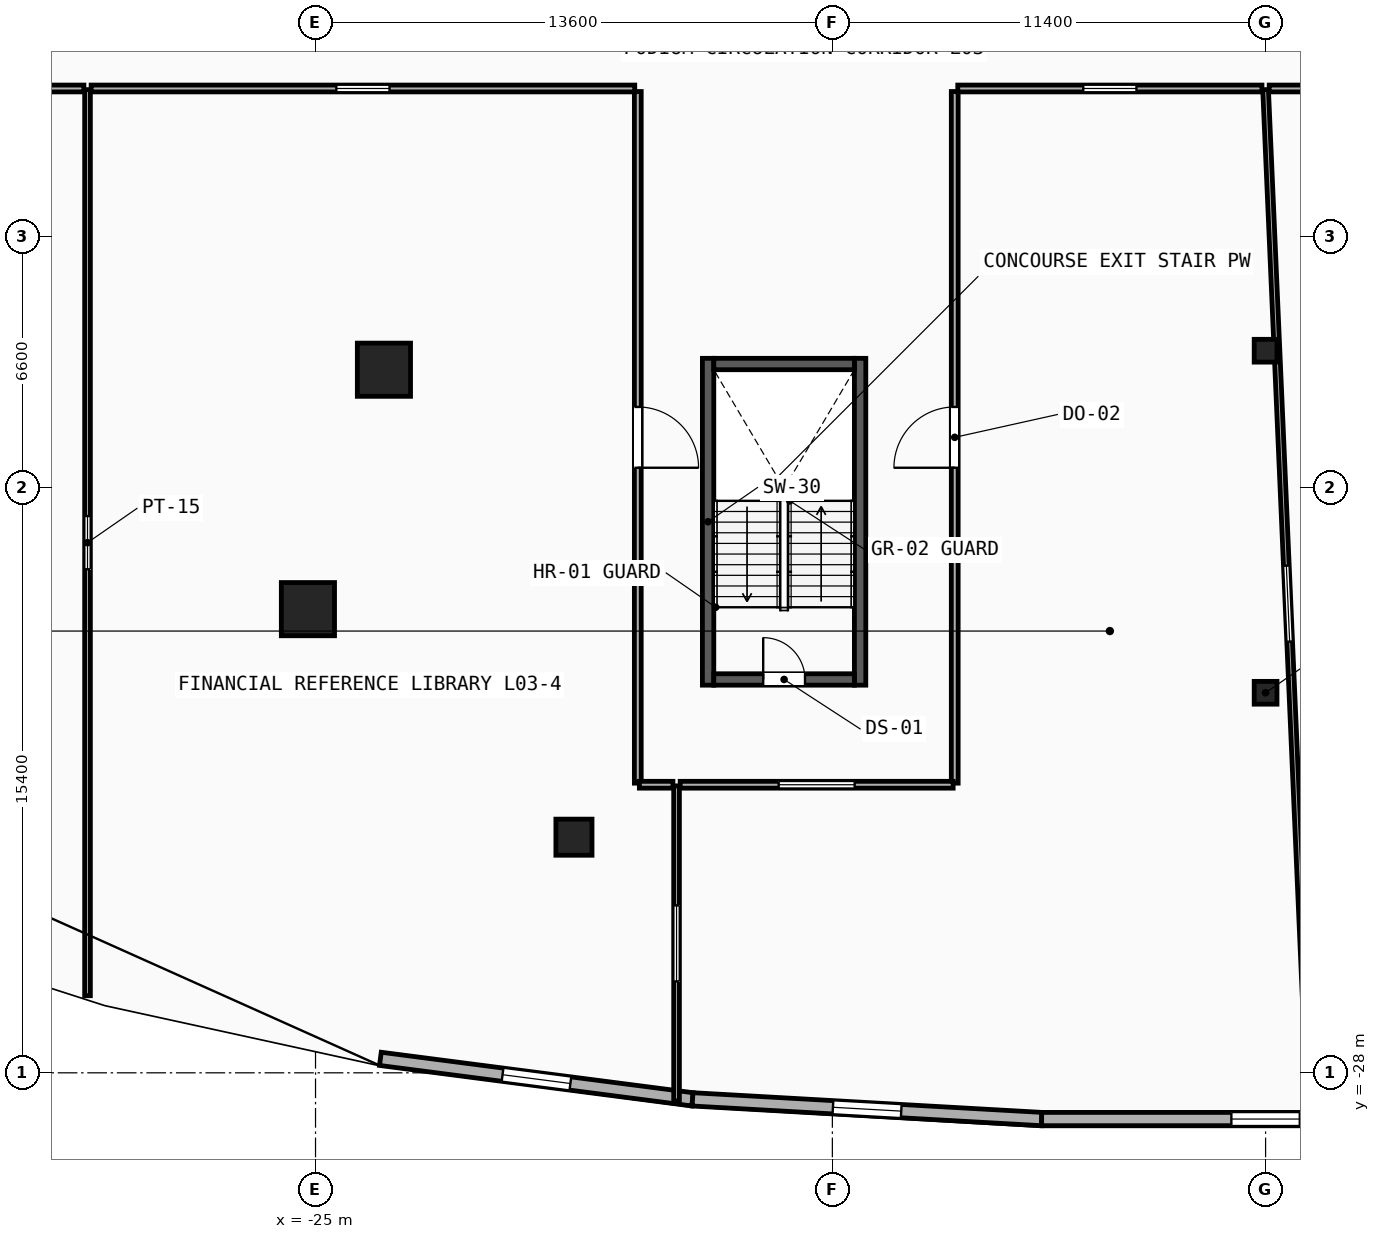
"""IFC4 building model, lengths in metres.
Left out: names, types, materials, properties, quantities, classifications, styles, units other than length and angle.
Written with IfcOpenShell. Run it as: python <this file> out.ifc"""

import sys

from ifc_helpers import new_model, si_unit, direction, frame, frame_2d, origin, origin_2d, place, context, subcontext, project, spatial, rectangle, hollow_rectangle, circle, extrude, element, fill, save


model = new_model("IFC4")
c1 = context("Model", 3, precision=1e-05, world=origin(), true_north=direction((0.0, 1.0)))
c2 = subcontext(c1, "Body", "Model", "MODEL_VIEW")
j1 = project(units=[si_unit("LENGTHUNIT", "METRE"), si_unit("PLANEANGLEUNIT", "RADIAN")], contexts=[c1])
p1 = place(None, origin())
s1 = spatial("IfcSite", under=j1, at=p1, CompositionType="ELEMENT")
p2 = place(p1, origin())
s2 = spatial("IfcBuilding", under=s1, at=p2, CompositionType="ELEMENT")
p3 = place(p2, frame((0.0, 0.0, 16.0)))
s3 = spatial("IfcBuildingStorey", under=s2, at=p3, CompositionType="ELEMENT", Elevation=16.0)
for number, where, z_axis, x_axis in (
    (1, (-23.2, -9.5, 0.0), (0.0, 0.0, 1.0), (1.0, 0.0, 0.0)),
    (2, (-25.2, -15.8, 0.0), (0.0, 0.0, 1.0), (1.0, 0.0, 0.0)),
):
    element("IfcColumn", number, at=place(p3, frame(where, z_axis=z_axis, x_axis=x_axis)), inside=s3, PredefinedType="COLUMN", context=c2, shape_type="SweptSolid", body=[
        extrude(rectangle(XDim=1.4, YDim=1.4, at=origin_2d()), origin(), (0.0, 0.0, 1.0), 4.0),
    ])
for number, where, z_axis, x_axis in (
    (3, (0.0, -18.0, 0.0), (0.0, 0.0, 1.0), (1.0, 0.0, 0.0)),
    (4, (0.0, -9.0, 0.0), (0.0, 0.0, 1.0), (1.0, 0.0, 0.0)),
):
    element("IfcColumn", number, at=place(p3, frame(where, z_axis=z_axis, x_axis=x_axis)), inside=s3, PredefinedType="COLUMN", context=c2, shape_type="SweptSolid", body=[
        extrude(hollow_rectangle(XDim=0.6, YDim=0.6, WallThickness=0.032, at=origin_2d()), origin(), (0.0, 0.0, 1.0), 4.0),
    ])
p4 = place(p3, frame((-18.2, -21.8, 0.0), z_axis=(0.0, 0.0, 1.0), x_axis=(1.0, 0.0, 0.0)))
e5 = element("IfcColumn", 5, at=p4, inside=s3, PredefinedType="PILASTER", context=c2, shape_type="SweptSolid", body=[
    extrude(circle(Radius=0.475, at=origin_2d()), origin(), (0.0, 0.0, 1.0), 4.0),
])
p5 = place(p3, frame((-23.293, -27.632, 0.0), z_axis=(0.0, 0.0, 1.0), x_axis=(0.99168663472, -0.128676410104, 0.0)))
e6 = element("IfcWall", 6, at=p5, inside=s3, PredefinedType="SOLIDWALL", context=c2, shape_type="SweptSolid", body=[
    extrude(rectangle(XDim=8.284, YDim=0.35, at=frame_2d((4.142, 0.0))), origin(), (0.0, 0.0, 1.0), 3.65),
])
p6 = place(p5, frame((3.242, 0.0, 0.85)))
e7 = element("IfcOpeningElement", 7, at=p6, cuts=e6, PredefinedType="OPENING", context=c2, shape_type="SweptSolid", body=[
    extrude(rectangle(XDim=1.8, YDim=2.4, at=frame_2d((0.9, 1.2))), frame((0.0, 0.185, 0.0), z_axis=(0.0, -1.0, 0.0), x_axis=(1.0, 0.0, 0.0)), (0.0, 0.0, 1.0), 0.37),
])
p7 = place(p3, frame((-15.079, -28.698, 0.0), z_axis=(0.0, 0.0, 1.0), x_axis=(0.998413463137, -0.056307695976, 0.0)))
e8 = element("IfcWall", 8, at=p7, inside=s3, PredefinedType="SOLIDWALL", context=c2, shape_type="SweptSolid", body=[
    extrude(rectangle(XDim=9.201, YDim=0.35, at=frame_2d((4.6, 0.0))), origin(), (0.0, 0.0, 1.0), 3.65),
])
p8 = place(p7, frame((3.7, 0.0, 0.85)))
e9 = element("IfcOpeningElement", 9, at=p8, cuts=e8, PredefinedType="OPENING", context=c2, shape_type="SweptSolid", body=[
    extrude(rectangle(XDim=1.8, YDim=2.4, at=frame_2d((0.9, 1.2))), frame((0.0, 0.185, 0.0), z_axis=(0.0, -1.0, 0.0), x_axis=(1.0, 0.0, 0.0)), (0.0, 0.0, 1.0), 0.37),
])
p9 = place(p3, frame((-5.893, -29.216, 0.0), z_axis=(0.0, 0.0, 1.0), x_axis=(1.0, 0.0, 0.0)))
e10 = element("IfcWall", 10, at=p9, inside=s3, PredefinedType="SOLIDWALL", context=c2, shape_type="SweptSolid", body=[
    extrude(rectangle(XDim=11.785, YDim=0.35, at=frame_2d((5.893, 0.0))), origin(), (0.0, 0.0, 1.0), 3.65),
])
p10 = place(p9, frame((4.992, 0.0, 0.85)))
e11 = element("IfcOpeningElement", 11, at=p10, cuts=e10, PredefinedType="OPENING", context=c2, shape_type="SweptSolid", body=[
    extrude(rectangle(XDim=1.8, YDim=2.4, at=frame_2d((0.9, 1.2))), frame((0.0, 0.185, 0.0), z_axis=(0.0, -1.0, 0.0), x_axis=(1.0, 0.0, 0.0)), (0.0, 0.0, 1.0), 0.37),
])
for number, where, z_axis, x_axis in (
    (12, (-14.67, -17.8, 0.0), (0.0, 0.0, 1.0), (0.0, 1.0, 0.0)),
    (13, (-10.67, -17.8, 0.0), (0.0, 0.0, 1.0), (0.0, 1.0, 0.0)),
):
    element("IfcWall", number, at=place(p3, frame(where, z_axis=z_axis, x_axis=x_axis)), inside=s3, PredefinedType="SHEAR", context=c2, shape_type="SweptSolid", body=[
        extrude(rectangle(XDim=8.6, YDim=0.3, at=frame_2d((4.3, 0.0))), origin(), (0.0, 0.0, 1.0), 3.65),
    ])
p11 = place(p3, frame((-14.52, -17.65, 0.0), z_axis=(0.0, 0.0, 1.0), x_axis=(1.0, 0.0, 0.0)))
e14 = element("IfcWall", 14, at=p11, inside=s3, PredefinedType="SHEAR", context=c2, shape_type="SweptSolid", body=[
    extrude(rectangle(XDim=3.7, YDim=0.3, at=frame_2d((1.85, 0.0))), origin(), (0.0, 0.0, 1.0), 3.65),
])
p12 = place(p11, frame((1.3, 0.0, 0.0)))
e15 = element("IfcOpeningElement", 15, at=p12, cuts=e14, PredefinedType="OPENING", context=c2, shape_type="SweptSolid", body=[
    extrude(rectangle(XDim=1.1, YDim=2.15, at=frame_2d((0.55, 1.075))), frame((0.0, 0.16, 0.0), z_axis=(0.0, -1.0, 0.0), x_axis=(1.0, 0.0, 0.0)), (0.0, 0.0, 1.0), 0.32),
])
p13 = place(p3, frame((-14.52, -9.35, 0.0), z_axis=(0.0, 0.0, 1.0), x_axis=(1.0, 0.0, 0.0)))
e16 = element("IfcWall", 16, at=p13, inside=s3, PredefinedType="SHEAR", context=c2, shape_type="SweptSolid", body=[
    extrude(rectangle(XDim=3.7, YDim=0.3, at=frame_2d((1.85, 0.0))), origin(), (0.0, 0.0, 1.0), 3.65),
])
p14 = place(p3, frame((-31.0, -25.971, 0.0), z_axis=(0.0, 0.0, 1.0), x_axis=(0.0, 1.0, 0.0)))
e17 = element("IfcWall", 17, at=p14, inside=s3, PredefinedType="PARTITIONING", context=c2, shape_type="SweptSolid", body=[
    extrude(rectangle(XDim=23.841, YDim=0.15, at=frame_2d((11.921, 0.0))), origin(), (0.0, 0.0, 1.0), 3.65),
])
p15 = place(p14, frame((11.221, 0.0, 1.05)))
e18 = element("IfcOpeningElement", 18, at=p15, cuts=e17, PredefinedType="OPENING", context=c2, shape_type="SweptSolid", body=[
    extrude(rectangle(XDim=1.4, YDim=1.5, at=frame_2d((0.7, 0.75))), frame((0.0, 0.085, 0.0), z_axis=(0.0, -1.0, 0.0), x_axis=(1.0, 0.0, 0.0)), (0.0, 0.0, 1.0), 0.17),
])
p16 = place(p3, frame((-15.5, -28.74, 0.0), z_axis=(0.0, 0.0, 1.0), x_axis=(0.0, 1.0, 0.0)))
e19 = element("IfcWall", 19, at=p16, inside=s3, PredefinedType="PARTITIONING", context=c2, shape_type="SweptSolid", body=[
    extrude(rectangle(XDim=8.29, YDim=0.15, at=frame_2d((4.145, 0.0))), origin(), (0.0, 0.0, 1.0), 3.65),
])
p17 = place(p16, frame((3.145, 0.0, 1.05)))
e20 = element("IfcOpeningElement", 20, at=p17, cuts=e19, PredefinedType="OPENING", context=c2, shape_type="SweptSolid", body=[
    extrude(rectangle(XDim=2.0, YDim=1.5, at=frame_2d((1.0, 0.75))), frame((0.0, 0.085, 0.0), z_axis=(0.0, -1.0, 0.0), x_axis=(1.0, 0.0, 0.0)), (0.0, 0.0, 1.0), 0.17),
])
p18 = place(p3, frame((1.179, -29.18, 0.0), z_axis=(0.0, 0.0, 1.0), x_axis=(-0.043560875221, 0.999050774561, 0.0)))
e21 = element("IfcWall", 21, at=p18, inside=s3, PredefinedType="PARTITIONING", context=c2, shape_type="SweptSolid", body=[
    extrude(rectangle(XDim=27.076, YDim=0.15, at=frame_2d((13.538, 0.0))), origin(), (0.0, 0.0, 1.0), 2.877),
])
p19 = place(p18, frame((12.538, 0.0, 1.05)))
e22 = element("IfcOpeningElement", 22, at=p19, cuts=e21, PredefinedType="OPENING", context=c2, shape_type="SweptSolid", body=[
    extrude(rectangle(XDim=2.0, YDim=1.5, at=frame_2d((1.0, 0.75))), frame((0.0, 0.085, 0.0), z_axis=(0.0, -1.0, 0.0), x_axis=(1.0, 0.0, 0.0)), (0.0, 0.0, 1.0), 0.17),
])
p20 = place(p3, frame((-8.18, -20.378, 0.0), z_axis=(0.0, 0.0, 1.0), x_axis=(0.0, 1.0, 0.0)))
e23 = element("IfcWall", 23, at=p20, inside=s3, PredefinedType="PARTITIONING", context=c2, shape_type="SweptSolid", body=[
    extrude(rectangle(XDim=18.198, YDim=0.18, at=frame_2d((9.099, 0.0))), origin(), (0.0, 0.0, 1.0), 3.65),
])
p21 = place(p20, frame((8.299, 0.0, 0.0)))
e24 = element("IfcOpeningElement", 24, at=p21, cuts=e23, PredefinedType="OPENING", context=c2, shape_type="SweptSolid", body=[
    extrude(rectangle(XDim=1.6, YDim=2.2, at=frame_2d((0.8, 1.1))), frame((0.0, 0.1, 0.0), z_axis=(0.0, -1.0, 0.0), x_axis=(1.0, 0.0, 0.0)), (0.0, 0.0, 1.0), 0.2),
])
p22 = place(p3, frame((-8.1, -2.1, 0.0), z_axis=(0.0, 0.0, 1.0), x_axis=(1.0, 0.0, 0.0)))
e25 = element("IfcWall", 25, at=p22, inside=s3, PredefinedType="PARTITIONING", context=c2, shape_type="SweptSolid", body=[
    extrude(rectangle(XDim=8.005, YDim=0.18, at=frame_2d((4.002, 0.0))), origin(), (0.0, 0.0, 1.0), 3.65),
])
p23 = place(p22, frame((3.302, 0.0, 1.05)))
e26 = element("IfcOpeningElement", 26, at=p23, cuts=e25, PredefinedType="OPENING", context=c2, shape_type="SweptSolid", body=[
    extrude(rectangle(XDim=1.4, YDim=1.5, at=frame_2d((0.7, 0.75))), frame((0.0, 0.1, 0.0), z_axis=(0.0, -1.0, 0.0), x_axis=(1.0, 0.0, 0.0)), (0.0, 0.0, 1.0), 0.2),
])
p24 = place(p3, frame((-15.405, -20.42, 0.0), z_axis=(0.0, 0.0, 1.0), x_axis=(1.0, 0.0, 0.0)))
e27 = element("IfcWall", 27, at=p24, inside=s3, PredefinedType="PARTITIONING", context=c2, shape_type="SweptSolid", body=[
    extrude(rectangle(XDim=7.184, YDim=0.18, at=frame_2d((3.592, 0.0))), origin(), (0.0, 0.0, 1.0), 3.65),
])
p25 = place(p24, frame((2.592, 0.0, 1.05)))
e28 = element("IfcOpeningElement", 28, at=p25, cuts=e27, PredefinedType="OPENING", context=c2, shape_type="SweptSolid", body=[
    extrude(rectangle(XDim=2.0, YDim=1.5, at=frame_2d((1.0, 0.75))), frame((0.0, 0.1, 0.0), z_axis=(0.0, -1.0, 0.0), x_axis=(1.0, 0.0, 0.0)), (0.0, 0.0, 1.0), 0.2),
])
p26 = place(p3, frame((0.095, -2.1, 0.0), z_axis=(0.0, 0.0, 1.0), x_axis=(1.0, 0.0, 0.0)))
e29 = element("IfcWall", 29, at=p26, inside=s3, PredefinedType="PARTITIONING", context=c2, shape_type="SweptSolid", body=[
    extrude(rectangle(XDim=15.31, YDim=0.18, at=frame_2d((7.655, 0.0))), origin(), (0.0, 0.0, 1.0), 2.877),
])
p27 = place(p26, frame((6.855, 0.0, 0.0)))
e30 = element("IfcOpeningElement", 30, at=p27, cuts=e29, PredefinedType="OPENING", context=c2, shape_type="SweptSolid", body=[
    extrude(rectangle(XDim=1.6, YDim=2.2, at=frame_2d((0.8, 1.1))), frame((0.0, 0.1, 0.0), z_axis=(0.0, -1.0, 0.0), x_axis=(1.0, 0.0, 0.0)), (0.0, 0.0, 1.0), 0.2),
])
p28 = place(p3, frame((-16.52, -2.18, 0.0), z_axis=(0.0, 0.0, 1.0), x_axis=(0.0, -1.0, 0.0)))
e31 = element("IfcWall", 31, at=p28, inside=s3, PredefinedType="PARTITIONING", context=c2, shape_type="SweptSolid", body=[
    extrude(rectangle(XDim=18.198, YDim=0.18, at=frame_2d((9.099, 0.0))), origin(), (0.0, 0.0, 1.0), 3.65),
])
p29 = place(p28, frame((8.299, 0.0, 0.0)))
e32 = element("IfcOpeningElement", 32, at=p29, cuts=e31, PredefinedType="OPENING", context=c2, shape_type="SweptSolid", body=[
    extrude(rectangle(XDim=1.6, YDim=2.2, at=frame_2d((0.8, 1.1))), frame((0.0, 0.1, 0.0), z_axis=(0.0, -1.0, 0.0), x_axis=(1.0, 0.0, 0.0)), (0.0, 0.0, 1.0), 0.2),
])
p30 = place(p3, frame((-30.905, -2.1, 0.0), z_axis=(0.0, 0.0, 1.0), x_axis=(1.0, 0.0, 0.0)))
e33 = element("IfcWall", 33, at=p30, inside=s3, PredefinedType="PARTITIONING", context=c2, shape_type="SweptSolid", body=[
    extrude(rectangle(XDim=14.305, YDim=0.18, at=frame_2d((7.152, 0.0))), origin(), (0.0, 0.0, 1.0), 3.65),
])
p31 = place(p30, frame((6.452, 0.0, 1.05)))
e34 = element("IfcOpeningElement", 34, at=p31, cuts=e33, PredefinedType="OPENING", context=c2, shape_type="SweptSolid", body=[
    extrude(rectangle(XDim=1.4, YDim=1.5, at=frame_2d((0.7, 0.75))), frame((0.0, 0.1, 0.0), z_axis=(0.0, -1.0, 0.0), x_axis=(1.0, 0.0, 0.0)), (0.0, 0.0, 1.0), 0.2),
])
p32 = place(p3, frame((-16.479, -20.42, 0.0), z_axis=(0.0, 0.0, 1.0), x_axis=(1.0, 0.0, 0.0)))
e35 = element("IfcWall", 35, at=p32, inside=s3, PredefinedType="PARTITIONING", context=c2, shape_type="SweptSolid", body=[
    extrude(rectangle(XDim=0.884, YDim=0.18, at=frame_2d((0.442, 0.0))), origin(), (0.0, 0.0, 1.0), 3.65),
])
p33 = place(p3, frame((-35.479, -2.1, 0.0), z_axis=(0.0, 0.0, 1.0), x_axis=(1.0, 0.0, 0.0)))
e36 = element("IfcWall", 36, at=p33, inside=s3, PredefinedType="PARTITIONING", context=c2, shape_type="SweptSolid", body=[
    extrude(rectangle(XDim=4.384, YDim=0.18, at=frame_2d((2.192, 0.0))), origin(), (0.0, 0.0, 1.0), 3.65),
])
p34 = place(p6, origin())
e37 = element("IfcWindow", 37, at=p34, inside=s3, PartitioningType="SINGLE_PANEL", PredefinedType="WINDOW", context=c2, shape_type="SweptSolid", body=[
    extrude(rectangle(XDim=1.8, YDim=2.4, at=frame_2d((0.9, 1.2))), frame((0.0, 0.03, 0.0), z_axis=(0.0, -1.0, 0.0), x_axis=(1.0, 0.0, 0.0)), (0.0, 0.0, 1.0), 0.06),
])
fill(e7, e37)
p35 = place(p8, origin())
e38 = element("IfcWindow", 38, at=p35, inside=s3, PartitioningType="SINGLE_PANEL", PredefinedType="WINDOW", context=c2, shape_type="SweptSolid", body=[
    extrude(rectangle(XDim=1.8, YDim=2.4, at=frame_2d((0.9, 1.2))), frame((0.0, 0.03, 0.0), z_axis=(0.0, -1.0, 0.0), x_axis=(1.0, 0.0, 0.0)), (0.0, 0.0, 1.0), 0.06),
])
fill(e9, e38)
p36 = place(p10, origin())
e39 = element("IfcWindow", 39, at=p36, inside=s3, PartitioningType="SINGLE_PANEL", PredefinedType="WINDOW", context=c2, shape_type="SweptSolid", body=[
    extrude(rectangle(XDim=1.8, YDim=2.4, at=frame_2d((0.9, 1.2))), frame((0.0, 0.03, 0.0), z_axis=(0.0, -1.0, 0.0), x_axis=(1.0, 0.0, 0.0)), (0.0, 0.0, 1.0), 0.06),
])
fill(e11, e39)
p37 = place(p12, origin())
e40 = element("IfcDoor", 40, at=p37, inside=s3, OperationType="SINGLE_SWING_LEFT", PredefinedType="DOOR", context=c2, shape_type="SweptSolid", body=[
    extrude(rectangle(XDim=1.1, YDim=2.15, at=frame_2d((0.55, 1.075))), frame((0.0, 0.025, 0.0), z_axis=(0.0, -1.0, 0.0), x_axis=(1.0, 0.0, 0.0)), (0.0, 0.0, 1.0), 0.05),
])
fill(e15, e40)
p38 = place(p21, origin())
e41 = element("IfcDoor", 41, at=p38, inside=s3, OperationType="SINGLE_SWING_LEFT", PredefinedType="DOOR", context=c2, shape_type="SweptSolid", body=[
    extrude(rectangle(XDim=1.6, YDim=2.2, at=frame_2d((0.8, 1.1))), frame((0.0, 0.025, 0.0), z_axis=(0.0, -1.0, 0.0), x_axis=(1.0, 0.0, 0.0)), (0.0, 0.0, 1.0), 0.05),
])
fill(e24, e41)
p39 = place(p29, origin())
e42 = element("IfcDoor", 42, at=p39, inside=s3, OperationType="SINGLE_SWING_RIGHT", PredefinedType="DOOR", context=c2, shape_type="SweptSolid", body=[
    extrude(rectangle(XDim=1.6, YDim=2.2, at=frame_2d((0.8, 1.1))), frame((0.0, 0.025, 0.0), z_axis=(0.0, -1.0, 0.0), x_axis=(1.0, 0.0, 0.0)), (0.0, 0.0, 1.0), 0.05),
])
fill(e32, e42)
p40 = place(p15, origin())
e43 = element("IfcWindow", 43, at=p40, inside=s3, PartitioningType="SINGLE_PANEL", PredefinedType="WINDOW", context=c2, shape_type="SweptSolid", body=[
    extrude(rectangle(XDim=1.4, YDim=1.5, at=frame_2d((0.7, 0.75))), frame((0.0, 0.03, 0.0), z_axis=(0.0, -1.0, 0.0), x_axis=(1.0, 0.0, 0.0)), (0.0, 0.0, 1.0), 0.06),
])
fill(e18, e43)
p41 = place(p17, origin())
e44 = element("IfcWindow", 44, at=p41, inside=s3, PartitioningType="SINGLE_PANEL", PredefinedType="WINDOW", context=c2, shape_type="SweptSolid", body=[
    extrude(rectangle(XDim=2.0, YDim=1.5, at=frame_2d((1.0, 0.75))), frame((0.0, 0.03, 0.0), z_axis=(0.0, -1.0, 0.0), x_axis=(1.0, 0.0, 0.0)), (0.0, 0.0, 1.0), 0.06),
])
fill(e20, e44)
p42 = place(p19, origin())
e45 = element("IfcWindow", 45, at=p42, inside=s3, PartitioningType="SINGLE_PANEL", PredefinedType="WINDOW", context=c2, shape_type="SweptSolid", body=[
    extrude(rectangle(XDim=2.0, YDim=1.5, at=frame_2d((1.0, 0.75))), frame((0.0, 0.03, 0.0), z_axis=(0.0, -1.0, 0.0), x_axis=(1.0, 0.0, 0.0)), (0.0, 0.0, 1.0), 0.06),
])
fill(e22, e45)
p43 = place(p23, origin())
e46 = element("IfcWindow", 46, at=p43, inside=s3, PartitioningType="SINGLE_PANEL", PredefinedType="WINDOW", context=c2, shape_type="SweptSolid", body=[
    extrude(rectangle(XDim=1.4, YDim=1.5, at=frame_2d((0.7, 0.75))), frame((0.0, 0.03, 0.0), z_axis=(0.0, -1.0, 0.0), x_axis=(1.0, 0.0, 0.0)), (0.0, 0.0, 1.0), 0.06),
])
fill(e26, e46)
p44 = place(p25, origin())
e47 = element("IfcWindow", 47, at=p44, inside=s3, PartitioningType="SINGLE_PANEL", PredefinedType="WINDOW", context=c2, shape_type="SweptSolid", body=[
    extrude(rectangle(XDim=2.0, YDim=1.5, at=frame_2d((1.0, 0.75))), frame((0.0, 0.03, 0.0), z_axis=(0.0, -1.0, 0.0), x_axis=(1.0, 0.0, 0.0)), (0.0, 0.0, 1.0), 0.06),
])
fill(e28, e47)
p45 = place(p31, origin())
e48 = element("IfcWindow", 48, at=p45, inside=s3, PartitioningType="SINGLE_PANEL", PredefinedType="WINDOW", context=c2, shape_type="SweptSolid", body=[
    extrude(rectangle(XDim=1.4, YDim=1.5, at=frame_2d((0.7, 0.75))), frame((0.0, 0.03, 0.0), z_axis=(0.0, -1.0, 0.0), x_axis=(1.0, 0.0, 0.0)), (0.0, 0.0, 1.0), 0.06),
])
fill(e34, e48)
save(model, sys.argv[1])
